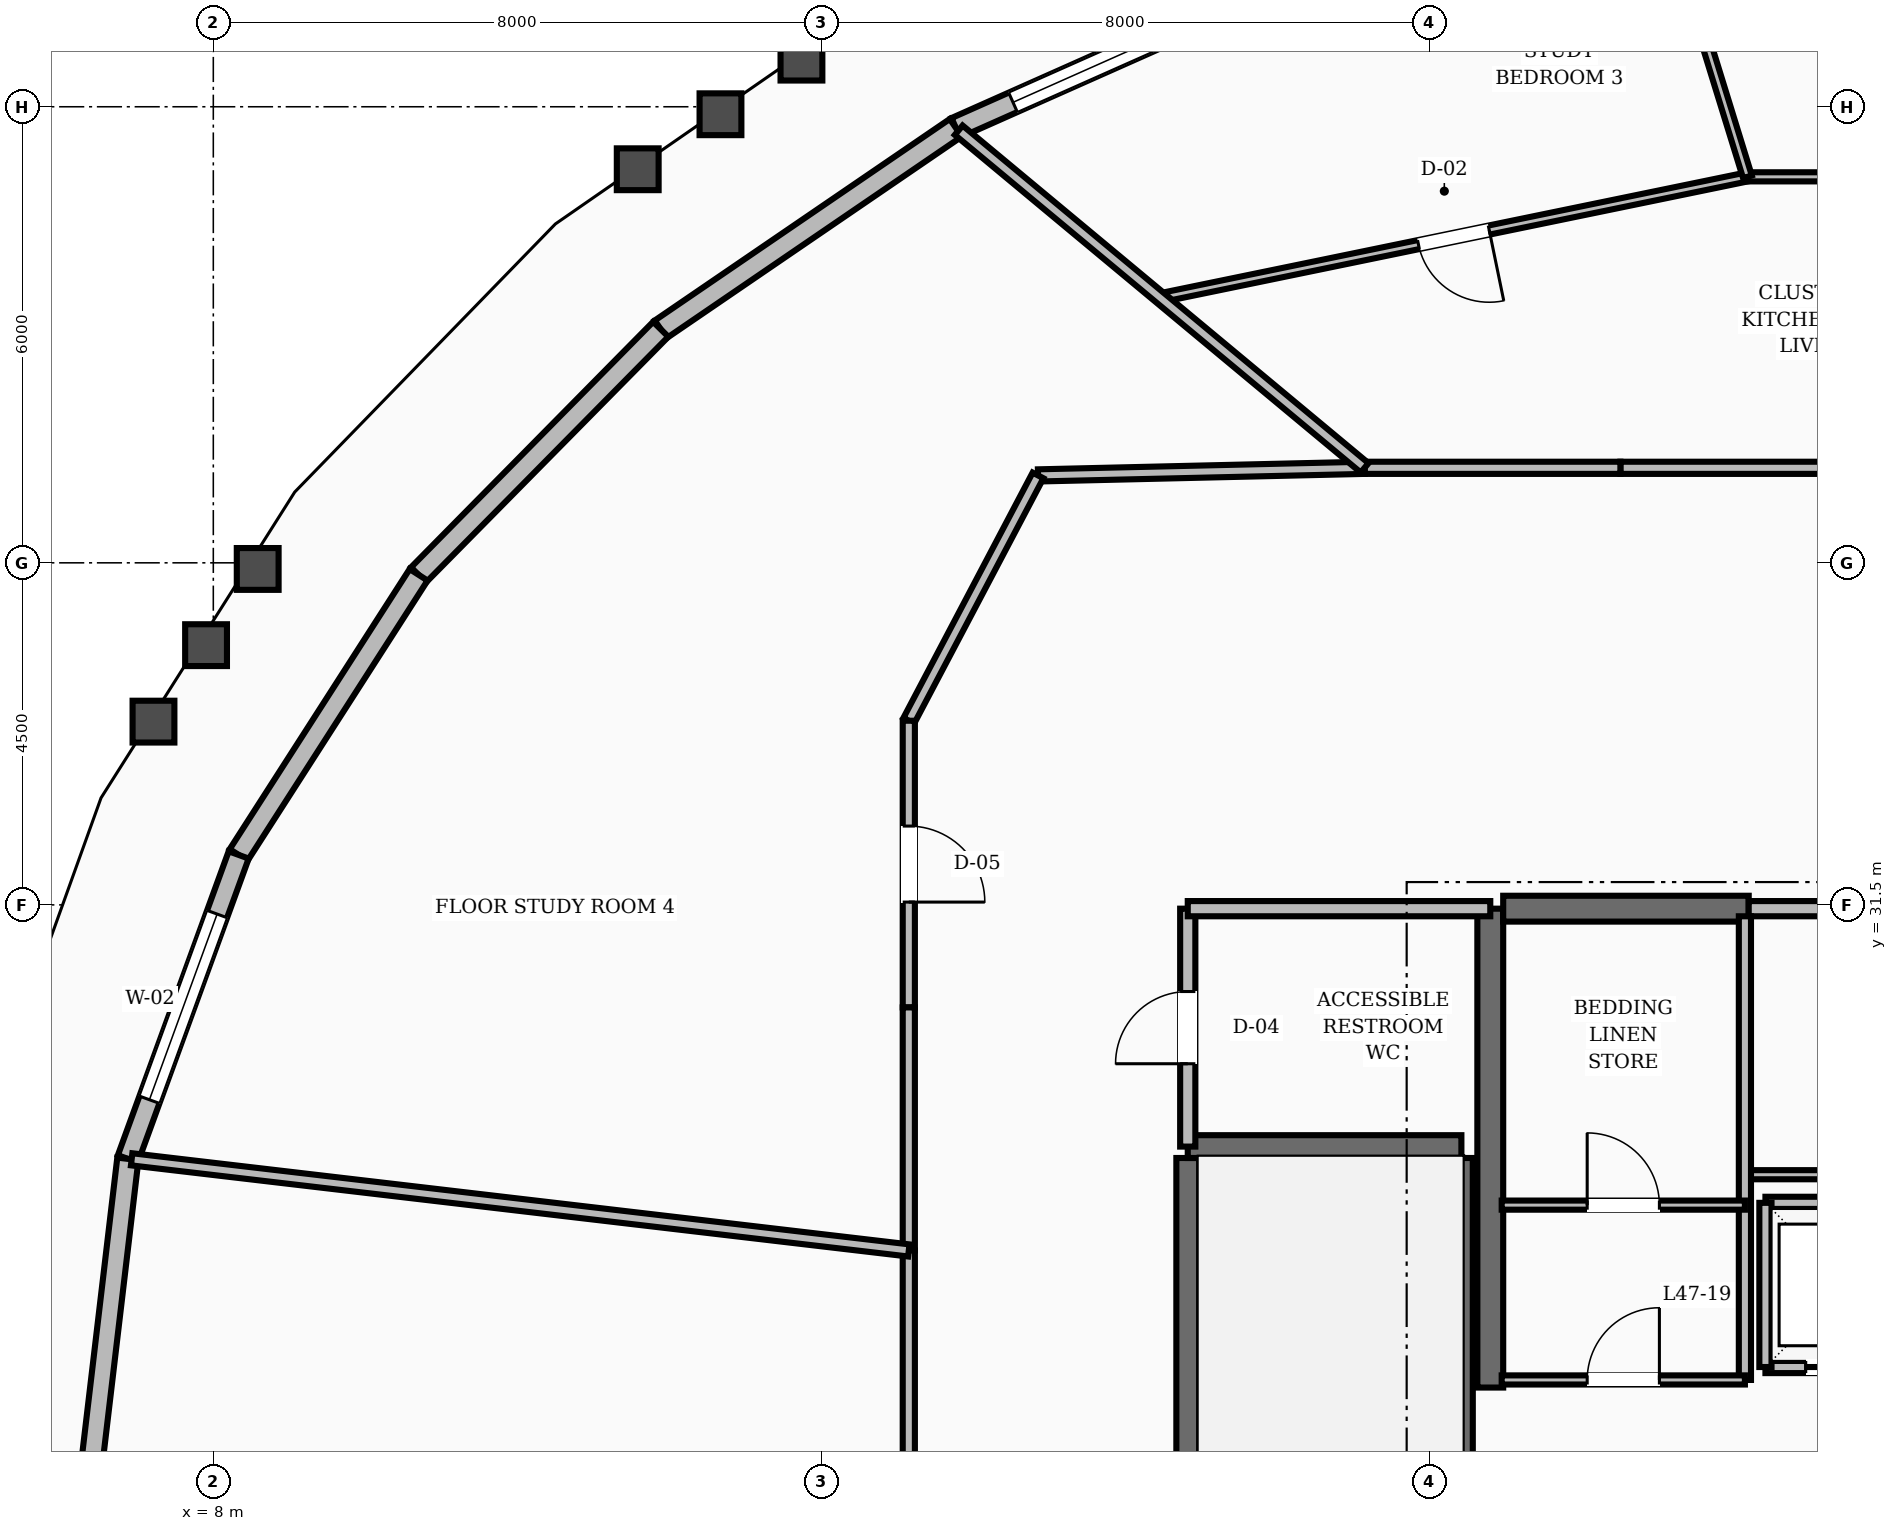
"""IFC4 building model, lengths in metres.
Left out: names, types, materials, properties, quantities, classifications, styles, units other than length and angle.
Written with IfcOpenShell. Run it as: python <this file> out.ifc"""

import sys

from ifc_helpers import new_model, si_unit, direction, frame, frame_2d, origin, place, context, subcontext, project, spatial, rectangle, extrude, element, fill, save


model = new_model("IFC4")
c1 = context("Model", 3, precision=1e-05, world=origin(), true_north=direction((0.0, 1.0)))
c2 = subcontext(c1, "Body", "Model", "MODEL_VIEW")
j1 = project(units=[si_unit("LENGTHUNIT", "METRE"), si_unit("PLANEANGLEUNIT", "RADIAN")], contexts=[c1])
p1 = place(None, origin())
s1 = spatial("IfcSite", under=j1, at=p1, CompositionType="ELEMENT")
p2 = place(p1, origin())
s2 = spatial("IfcBuilding", under=s1, at=p2, CompositionType="ELEMENT")
p3 = place(p2, frame((0.0, 0.0, 182.0)))
s3 = spatial("IfcBuildingStorey", under=s2, at=p3, CompositionType="ELEMENT", Elevation=182.0)
p4 = place(p3, frame((24.8, 25.15, 0.0), z_axis=(0.0, 0.0, 1.0), x_axis=(0.0, 1.0, 0.0)))
e1 = element("IfcWall", 1, at=p4, inside=s3, PredefinedType="SHEAR", context=c2, shape_type="SweptSolid", body=[
    extrude(rectangle(XDim=6.3, YDim=0.34, at=frame_2d((3.15, 0.0))), origin(), (0.0, 0.0, 1.0), 3.6),
])
p5 = place(p3, frame((24.97, 31.45, 0.0), z_axis=(0.0, 0.0, 1.0), x_axis=(1.0, 0.0, 0.0)))
e2 = element("IfcWall", 2, at=p5, inside=s3, PredefinedType="SHEAR", context=c2, shape_type="SweptSolid", body=[
    extrude(rectangle(XDim=3.23, YDim=0.34, at=frame_2d((1.615, 0.0))), origin(), (0.0, 0.0, 1.0), 3.6),
])
for number, where, z_axis, x_axis in (
    (3, (20.82, 19.43, 0.0), (0.0, 0.0, 1.0), (0.0, 1.0, 0.0)),
    (4, (24.42, 19.43, 0.0), (0.0, 0.0, 1.0), (0.0, 1.0, 0.0)),
):
    element("IfcWall", number, at=place(p3, frame(where, z_axis=z_axis, x_axis=x_axis)), inside=s3, PredefinedType="SHEAR", context=c2, shape_type="SweptSolid", body=[
        extrude(rectangle(XDim=8.74, YDim=0.3, at=frame_2d((4.37, 0.0))), origin(), (0.0, 0.0, 1.0), 3.6),
    ])
p6 = place(p3, frame((20.82, 28.32, 0.0), z_axis=(0.0, 0.0, 1.0), x_axis=(1.0, 0.0, 0.0)))
e5 = element("IfcWall", 5, at=p6, inside=s3, PredefinedType="SHEAR", context=c2, shape_type="SweptSolid", body=[
    extrude(rectangle(XDim=3.6, YDim=0.3, at=frame_2d((1.8, 0.0))), origin(), (0.0, 0.0, 1.0), 3.6),
])
p7 = place(p3, frame((22.197, 43.693, 0.0), z_axis=(0.0, 0.0, 1.0), x_axis=(-0.913703507389, -0.406381471754, 0.0)))
e6 = element("IfcWall", 6, at=p7, inside=s3, PredefinedType="STANDARD", context=c2, shape_type="SweptSolid", body=[
    extrude(rectangle(XDim=4.847, YDim=0.28, at=frame_2d((2.423, 0.0))), origin(), (0.0, 0.0, 1.0), 2.82),
])
p8 = place(p7, frame((0.823, 0.0, 0.8)))
e7 = element("IfcOpeningElement", 7, at=p8, cuts=e6, PredefinedType="OPENING", context=c2, shape_type="SweptSolid", body=[
    extrude(rectangle(XDim=3.2, YDim=1.65, at=frame_2d((1.6, 0.825))), frame((0.0, 0.15, 0.0), z_axis=(0.0, -1.0, 0.0), x_axis=(1.0, 0.0, 0.0)), (0.0, 0.0, 1.0), 0.3),
])
p9 = place(p3, frame((17.768, 41.723, 0.0), z_axis=(0.0, 0.0, 1.0), x_axis=(-0.825797441916, -0.563966829632, 0.0)))
e8 = element("IfcWall", 8, at=p9, inside=s3, PredefinedType="STANDARD", context=c2, shape_type="SweptSolid", body=[
    extrude(rectangle(XDim=4.7, YDim=0.28, at=frame_2d((2.35, 0.0))), origin(), (0.0, 0.0, 1.0), 2.82),
])
p10 = place(p3, frame((13.887, 39.073, 0.0), z_axis=(0.0, 0.0, 1.0), x_axis=(-0.70219293187, -0.711986717876, 0.0)))
e9 = element("IfcWall", 9, at=p10, inside=s3, PredefinedType="STANDARD", context=c2, shape_type="SweptSolid", body=[
    extrude(rectangle(XDim=4.537, YDim=0.28, at=frame_2d((2.269, 0.0))), origin(), (0.0, 0.0, 1.0), 2.82),
])
p11 = place(p3, frame((10.701, 35.842, 0.0), z_axis=(0.0, 0.0, 1.0), x_axis=(-0.54047019892, -0.841363158261, 0.0)))
e10 = element("IfcWall", 10, at=p11, inside=s3, PredefinedType="STANDARD", context=c2, shape_type="SweptSolid", body=[
    extrude(rectangle(XDim=4.38, YDim=0.28, at=frame_2d((2.19, 0.0))), origin(), (0.0, 0.0, 1.0), 2.82),
])
p12 = place(p3, frame((8.334, 32.157, 0.0), z_axis=(0.0, 0.0, 1.0), x_axis=(-0.342502880714, -0.939516778298, 0.0)))
e11 = element("IfcWall", 11, at=p12, inside=s3, PredefinedType="STANDARD", context=c2, shape_type="SweptSolid", body=[
    extrude(rectangle(XDim=4.256, YDim=0.28, at=frame_2d((2.128, 0.0))), origin(), (0.0, 0.0, 1.0), 2.82),
])
p13 = place(p12, frame((0.828, 0.0, 0.8)))
e12 = element("IfcOpeningElement", 12, at=p13, cuts=e11, PredefinedType="OPENING", context=c2, shape_type="SweptSolid", body=[
    extrude(rectangle(XDim=2.6, YDim=1.65, at=frame_2d((1.3, 0.825))), frame((0.0, 0.15, 0.0), z_axis=(0.0, -1.0, 0.0), x_axis=(1.0, 0.0, 0.0)), (0.0, 0.0, 1.0), 0.3),
])
p14 = place(p3, frame((6.876, 28.158, 0.0), z_axis=(0.0, 0.0, 1.0), x_axis=(-0.117538064351, -0.993068378023, 0.0)))
e13 = element("IfcWall", 13, at=p14, inside=s3, PredefinedType="STANDARD", context=c2, shape_type="SweptSolid", body=[
    extrude(rectangle(XDim=4.188, YDim=0.28, at=frame_2d((2.094, 0.0))), origin(), (0.0, 0.0, 1.0), 2.82),
])
p15 = place(p3, frame((20.82, 28.32, 0.0), z_axis=(0.0, 0.0, 1.0), x_axis=(0.0, 1.0, 0.0)))
e14 = element("IfcWall", 14, at=p15, inside=s3, PredefinedType="SOLIDWALL", context=c2, shape_type="SweptSolid", body=[
    extrude(rectangle(XDim=3.13, YDim=0.2, at=frame_2d((1.565, 0.0))), origin(), (0.0, 0.0, 1.0), 2.8),
])
p16 = place(p15, frame((1.09, 0.0, 0.0)))
e15 = element("IfcOpeningElement", 15, at=p16, cuts=e14, PredefinedType="OPENING", context=c2, shape_type="SweptSolid", body=[
    extrude(rectangle(XDim=0.95, YDim=2.1, at=frame_2d((0.475, 1.05))), frame((0.0, 0.11, 0.0), z_axis=(0.0, -1.0, 0.0), x_axis=(1.0, 0.0, 0.0)), (0.0, 0.0, 1.0), 0.22),
])
p17 = place(p3, frame((20.82, 31.45, 0.0), z_axis=(0.0, 0.0, 1.0), x_axis=(1.0, 0.0, 0.0)))
e16 = element("IfcWall", 16, at=p17, inside=s3, PredefinedType="SOLIDWALL", context=c2, shape_type="SweptSolid", body=[
    extrude(rectangle(XDim=3.98, YDim=0.2, at=frame_2d((1.99, 0.0))), origin(), (0.0, 0.0, 1.0), 2.8),
])
p18 = place(p3, frame((28.42, 25.42, 0.0), z_axis=(0.0, 0.0, 1.0), x_axis=(1.0, 0.0, 0.0)))
e17 = element("IfcWall", 17, at=p18, inside=s3, PredefinedType="SOLIDWALL", context=c2, shape_type="SweptSolid", body=[
    extrude(rectangle(XDim=4.66, YDim=0.16, at=frame_2d((2.33, 0.0))), origin(), (0.0, 0.0, 1.0), 2.8),
])
p19 = place(p18, frame((0.53, 0.0, 0.0)))
e18 = element("IfcOpeningElement", 18, at=p19, cuts=e17, PredefinedType="OPENING", context=c2, shape_type="SweptSolid", body=[
    extrude(rectangle(XDim=1.1, YDim=2.15, at=frame_2d((0.55, 1.075))), frame((0.0, 0.09, 0.0), z_axis=(0.0, -1.0, 0.0), x_axis=(1.0, 0.0, 0.0)), (0.0, 0.0, 1.0), 0.18),
])
p20 = place(p18, frame((3.03, 0.0, 0.0)))
e19 = element("IfcOpeningElement", 19, at=p20, cuts=e17, PredefinedType="OPENING", context=c2, shape_type="SweptSolid", body=[
    extrude(rectangle(XDim=1.1, YDim=2.15, at=frame_2d((0.55, 1.075))), frame((0.0, 0.09, 0.0), z_axis=(0.0, -1.0, 0.0), x_axis=(1.0, 0.0, 0.0)), (0.0, 0.0, 1.0), 0.18),
])
p21 = place(p3, frame((28.42, 27.58, 0.0), z_axis=(0.0, 0.0, 1.0), x_axis=(1.0, 0.0, 0.0)))
e20 = element("IfcWall", 20, at=p21, inside=s3, PredefinedType="SOLIDWALL", context=c2, shape_type="SweptSolid", body=[
    extrude(rectangle(XDim=4.66, YDim=0.16, at=frame_2d((2.33, 0.0))), origin(), (0.0, 0.0, 1.0), 2.8),
])
p22 = place(p3, frame((28.42, 25.42, 0.0), z_axis=(0.0, 0.0, 1.0), x_axis=(0.0, 1.0, 0.0)))
e21 = element("IfcWall", 21, at=p22, inside=s3, PredefinedType="SOLIDWALL", context=c2, shape_type="SweptSolid", body=[
    extrude(rectangle(XDim=2.16, YDim=0.16, at=frame_2d((1.08, 0.0))), origin(), (0.0, 0.0, 1.0), 2.8),
])
p23 = place(p3, frame((28.2, 31.45, 0.0), z_axis=(0.0, 0.0, 1.0), x_axis=(1.0, 0.0, 0.0)))
e22 = element("IfcWall", 22, at=p23, inside=s3, PredefinedType="SOLIDWALL", context=c2, shape_type="SweptSolid", body=[
    extrude(rectangle(XDim=7.6, YDim=0.2, at=frame_2d((3.8, 0.0))), origin(), (0.0, 0.0, 1.0), 2.8),
])
p24 = place(p3, frame((28.2, 27.95, 0.0), z_axis=(0.0, 0.0, 1.0), x_axis=(1.0, 0.0, 0.0)))
e23 = element("IfcWall", 23, at=p24, inside=s3, PredefinedType="PARTITIONING", context=c2, shape_type="SweptSolid", body=[
    extrude(rectangle(XDim=7.6, YDim=0.12, at=frame_2d((3.8, 0.0))), origin(), (0.0, 0.0, 1.0), 2.8),
])
p25 = place(p3, frame((28.15, 25.25, 0.0), z_axis=(0.0, 0.0, 1.0), x_axis=(0.0, 1.0, 0.0)))
e24 = element("IfcWall", 24, at=p25, inside=s3, PredefinedType="SOLIDWALL", context=c2, shape_type="SweptSolid", body=[
    extrude(rectangle(XDim=6.1, YDim=0.16, at=frame_2d((3.05, 0.0))), origin(), (0.0, 0.0, 1.0), 2.8),
])
p26 = place(p3, frame((24.95, 25.25, 0.0), z_axis=(0.0, 0.0, 1.0), x_axis=(1.0, 0.0, 0.0)))
e25 = element("IfcWall", 25, at=p26, inside=s3, PredefinedType="PARTITIONING", context=c2, shape_type="SweptSolid", body=[
    extrude(rectangle(XDim=3.2, YDim=0.12, at=frame_2d((1.6, 0.0))), origin(), (0.0, 0.0, 1.0), 2.8),
])
p27 = place(p26, frame((1.125, 0.0, 0.0)))
e26 = element("IfcOpeningElement", 26, at=p27, cuts=e25, PredefinedType="OPENING", context=c2, shape_type="SweptSolid", body=[
    extrude(rectangle(XDim=0.95, YDim=2.1, at=frame_2d((0.475, 1.05))), frame((0.0, 0.07, 0.0), z_axis=(0.0, -1.0, 0.0), x_axis=(1.0, 0.0, 0.0)), (0.0, 0.0, 1.0), 0.14),
])
p28 = place(p3, frame((24.95, 27.55, 0.0), z_axis=(0.0, 0.0, 1.0), x_axis=(1.0, 0.0, 0.0)))
e27 = element("IfcWall", 27, at=p28, inside=s3, PredefinedType="PARTITIONING", context=c2, shape_type="SweptSolid", body=[
    extrude(rectangle(XDim=3.2, YDim=0.12, at=frame_2d((1.6, 0.0))), origin(), (0.0, 0.0, 1.0), 2.8),
])
p29 = place(p28, frame((1.125, 0.0, 0.0)))
e28 = element("IfcOpeningElement", 28, at=p29, cuts=e27, PredefinedType="OPENING", context=c2, shape_type="SweptSolid", body=[
    extrude(rectangle(XDim=0.95, YDim=2.1, at=frame_2d((0.475, 1.05))), frame((0.0, 0.07, 0.0), z_axis=(0.0, -1.0, 0.0), x_axis=(1.0, 0.0, 0.0)), (0.0, 0.0, 1.0), 0.14),
])
p30 = place(p3, frame((29.365, 37.25, 0.0), z_axis=(0.0, 0.0, 1.0), x_axis=(-1.0, 0.0, 0.0)))
e29 = element("IfcWall", 29, at=p30, inside=s3, PredefinedType="SOLIDWALL", context=c2, shape_type="SweptSolid", body=[
    extrude(rectangle(XDim=2.853, YDim=0.16, at=frame_2d((1.426, 0.0))), origin(), (0.0, 0.0, 1.0), 2.8),
])
p31 = place(p3, frame((26.512, 37.25, 0.0), z_axis=(0.0, 0.0, 1.0), x_axis=(-1.0, 0.0, 0.0)))
e30 = element("IfcWall", 30, at=p31, inside=s3, PredefinedType="SOLIDWALL", context=c2, shape_type="SweptSolid", body=[
    extrude(rectangle(XDim=3.365, YDim=0.16, at=frame_2d((1.683, 0.0))), origin(), (0.0, 0.0, 1.0), 2.8),
])
p32 = place(p3, frame((23.146, 37.25, 0.0), z_axis=(0.0, 0.0, 1.0), x_axis=(-0.999728709658, -0.023291781507, 0.0)))
e31 = element("IfcWall", 31, at=p32, inside=s3, PredefinedType="SOLIDWALL", context=c2, shape_type="SweptSolid", body=[
    extrude(rectangle(XDim=4.298, YDim=0.16, at=frame_2d((2.149, 0.0))), origin(), (0.0, 0.0, 1.0), 2.8),
])
p33 = place(p3, frame((18.85, 37.15, 0.0), z_axis=(0.0, 0.0, 1.0), x_axis=(-0.466093963429, -0.884735224378, 0.0)))
e32 = element("IfcWall", 32, at=p33, inside=s3, PredefinedType="SOLIDWALL", context=c2, shape_type="SweptSolid", body=[
    extrude(rectangle(XDim=3.648, YDim=0.16, at=frame_2d((1.824, 0.0))), origin(), (0.0, 0.0, 1.0), 2.8),
])
p34 = place(p3, frame((17.15, 33.923, 0.0), z_axis=(0.0, 0.0, 1.0), x_axis=(0.0, -1.0, 0.0)))
e33 = element("IfcWall", 33, at=p34, inside=s3, PredefinedType="SOLIDWALL", context=c2, shape_type="SweptSolid", body=[
    extrude(rectangle(XDim=3.771, YDim=0.16, at=frame_2d((1.886, 0.0))), origin(), (0.0, 0.0, 1.0), 2.8),
])
p35 = place(p34, frame((1.386, 0.0, 0.0)))
e34 = element("IfcOpeningElement", 34, at=p35, cuts=e33, PredefinedType="OPENING", context=c2, shape_type="SweptSolid", body=[
    extrude(rectangle(XDim=1.0, YDim=2.1, at=frame_2d((0.5, 1.05))), frame((0.0, 0.09, 0.0), z_axis=(0.0, -1.0, 0.0), x_axis=(1.0, 0.0, 0.0)), (0.0, 0.0, 1.0), 0.18),
])
p36 = place(p3, frame((17.15, 30.151, 0.0), z_axis=(0.0, 0.0, 1.0), x_axis=(0.0, -1.0, 0.0)))
e35 = element("IfcWall", 35, at=p36, inside=s3, PredefinedType="SOLIDWALL", context=c2, shape_type="SweptSolid", body=[
    extrude(rectangle(XDim=3.197, YDim=0.16, at=frame_2d((1.599, 0.0))), origin(), (0.0, 0.0, 1.0), 2.8),
])
p37 = place(p3, frame((17.15, 26.954, 0.0), z_axis=(0.0, 0.0, 1.0), x_axis=(0.0, -1.0, 0.0)))
e36 = element("IfcWall", 36, at=p37, inside=s3, PredefinedType="SOLIDWALL", context=c2, shape_type="SweptSolid", body=[
    extrude(rectangle(XDim=2.954, YDim=0.16, at=frame_2d((1.477, 0.0))), origin(), (0.0, 0.0, 1.0), 2.8),
])
p38 = place(p3, frame((35.816, 41.078, 0.0), z_axis=(0.0, 0.0, 1.0), x_axis=(-1.0, 0.0, 0.0)))
e37 = element("IfcWall", 37, at=p38, inside=s3, PredefinedType="PARTITIONING", context=c2, shape_type="SweptSolid", body=[
    extrude(rectangle(XDim=7.633, YDim=0.12, at=frame_2d((3.816, 0.0))), origin(), (0.0, 0.0, 1.0), 2.8),
])
p39 = place(p38, frame((3.342, 0.0, 0.0)))
e38 = element("IfcOpeningElement", 38, at=p39, cuts=e37, PredefinedType="OPENING", context=c2, shape_type="SweptSolid", body=[
    extrude(rectangle(XDim=0.95, YDim=2.1, at=frame_2d((0.475, 1.05))), frame((0.0, 0.07, 0.0), z_axis=(0.0, -1.0, 0.0), x_axis=(1.0, 0.0, 0.0)), (0.0, 0.0, 1.0), 0.14),
])
p40 = place(p3, frame((28.184, 41.078, 0.0), z_axis=(0.0, 0.0, 1.0), x_axis=(-0.979440858822, -0.201731514814, 0.0)))
e39 = element("IfcWall", 39, at=p40, inside=s3, PredefinedType="PARTITIONING", context=c2, shape_type="SweptSolid", body=[
    extrude(rectangle(XDim=7.888, YDim=0.12, at=frame_2d((3.944, 0.0))), origin(), (0.0, 0.0, 1.0), 2.8),
])
p41 = place(p40, frame((3.469, 0.0, 0.0)))
e40 = element("IfcOpeningElement", 40, at=p41, cuts=e39, PredefinedType="OPENING", context=c2, shape_type="SweptSolid", body=[
    extrude(rectangle(XDim=0.95, YDim=2.1, at=frame_2d((0.475, 1.05))), frame((0.0, 0.07, 0.0), z_axis=(0.0, -1.0, 0.0), x_axis=(1.0, 0.0, 0.0)), (0.0, 0.0, 1.0), 0.14),
])
p42 = place(p3, frame((28.184, 41.078, 0.0), z_axis=(0.0, 0.0, 1.0), x_axis=(-0.294857647308, 0.955541191066, 0.0)))
e41 = element("IfcWall", 41, at=p42, inside=s3, PredefinedType="PARTITIONING", context=c2, shape_type="SweptSolid", body=[
    extrude(rectangle(XDim=3.956, YDim=0.12, at=frame_2d((1.978, 0.0))), origin(), (0.0, 0.0, 1.0), 2.8),
])
p43 = place(p3, frame((23.146, 37.25, 0.0), z_axis=(0.0, 0.0, 1.0), x_axis=(-0.768805862504, 0.639482248213, 0.0)))
e42 = element("IfcWall", 42, at=p43, inside=s3, PredefinedType="SOLIDWALL", context=c2, shape_type="SweptSolid", body=[
    extrude(rectangle(XDim=6.945, YDim=0.16, at=frame_2d((3.473, 0.0))), origin(), (0.0, 0.0, 1.0), 2.8),
])
p44 = place(p3, frame((17.15, 26.954, 0.0), z_axis=(0.0, 0.0, 1.0), x_axis=(-0.993196826009, 0.116447691287, 0.0)))
e43 = element("IfcWall", 43, at=p44, inside=s3, PredefinedType="SOLIDWALL", context=c2, shape_type="SweptSolid", body=[
    extrude(rectangle(XDim=10.294, YDim=0.16, at=frame_2d((5.147, 0.0))), origin(), (0.0, 0.0, 1.0), 2.8),
])
p45 = place(p8, origin())
e44 = element("IfcWindow", 44, at=p45, inside=s3, PartitioningType="SINGLE_PANEL", PredefinedType="WINDOW", context=c2, shape_type="SweptSolid", body=[
    extrude(rectangle(XDim=3.2, YDim=1.65, at=frame_2d((1.6, 0.825))), frame((0.0, 0.03, 0.0), z_axis=(0.0, -1.0, 0.0), x_axis=(1.0, 0.0, 0.0)), (0.0, 0.0, 1.0), 0.06),
])
fill(e7, e44)
p46 = place(p13, origin())
e45 = element("IfcWindow", 45, at=p46, inside=s3, PartitioningType="SINGLE_PANEL", PredefinedType="WINDOW", context=c2, shape_type="SweptSolid", body=[
    extrude(rectangle(XDim=2.6, YDim=1.65, at=frame_2d((1.3, 0.825))), frame((0.0, 0.03, 0.0), z_axis=(0.0, -1.0, 0.0), x_axis=(1.0, 0.0, 0.0)), (0.0, 0.0, 1.0), 0.06),
])
fill(e12, e45)
p47 = place(p16, origin())
e46 = element("IfcDoor", 46, at=p47, inside=s3, OperationType="SINGLE_SWING_LEFT", PredefinedType="DOOR", context=c2, shape_type="SweptSolid", body=[
    extrude(rectangle(XDim=0.95, YDim=2.1, at=frame_2d((0.475, 1.05))), frame((0.0, 0.025, 0.0), z_axis=(0.0, -1.0, 0.0), x_axis=(1.0, 0.0, 0.0)), (0.0, 0.0, 1.0), 0.05),
])
fill(e15, e46)
p48 = place(p19, origin())
e47 = element("IfcDoor", 47, at=p48, inside=s3, OperationType="SLIDING_TO_RIGHT", PredefinedType="DOOR", context=c2, shape_type="SweptSolid", body=[
    extrude(rectangle(XDim=1.1, YDim=2.15, at=frame_2d((0.55, 1.075))), frame((0.0, 0.025, 0.0), z_axis=(0.0, -1.0, 0.0), x_axis=(1.0, 0.0, 0.0)), (0.0, 0.0, 1.0), 0.05),
])
fill(e18, e47)
p49 = place(p27, origin())
e48 = element("IfcDoor", 48, at=p49, inside=s3, OperationType="SINGLE_SWING_RIGHT", PredefinedType="DOOR", context=c2, shape_type="SweptSolid", body=[
    extrude(rectangle(XDim=0.95, YDim=2.1, at=frame_2d((0.475, 1.05))), frame((0.0, 0.025, 0.0), z_axis=(0.0, -1.0, 0.0), x_axis=(1.0, 0.0, 0.0)), (0.0, 0.0, 1.0), 0.05),
])
fill(e26, e48)
p50 = place(p29, origin())
e49 = element("IfcDoor", 49, at=p50, inside=s3, OperationType="SINGLE_SWING_LEFT", PredefinedType="DOOR", context=c2, shape_type="SweptSolid", body=[
    extrude(rectangle(XDim=0.95, YDim=2.1, at=frame_2d((0.475, 1.05))), frame((0.0, 0.025, 0.0), z_axis=(0.0, -1.0, 0.0), x_axis=(1.0, 0.0, 0.0)), (0.0, 0.0, 1.0), 0.05),
])
fill(e28, e49)
p51 = place(p41, origin())
e50 = element("IfcDoor", 50, at=p51, inside=s3, OperationType="SINGLE_SWING_LEFT", PredefinedType="DOOR", context=c2, shape_type="SweptSolid", body=[
    extrude(rectangle(XDim=0.95, YDim=2.1, at=frame_2d((0.475, 1.05))), frame((0.0, 0.025, 0.0), z_axis=(0.0, -1.0, 0.0), x_axis=(1.0, 0.0, 0.0)), (0.0, 0.0, 1.0), 0.05),
])
fill(e40, e50)
p52 = place(p35, origin())
e51 = element("IfcDoor", 51, at=p52, inside=s3, OperationType="SINGLE_SWING_RIGHT", PredefinedType="DOOR", context=c2, shape_type="SweptSolid", body=[
    extrude(rectangle(XDim=1.0, YDim=2.1, at=frame_2d((0.5, 1.05))), frame((0.0, 0.025, 0.0), z_axis=(0.0, -1.0, 0.0), x_axis=(1.0, 0.0, 0.0)), (0.0, 0.0, 1.0), 0.05),
])
fill(e34, e51)
save(model, sys.argv[1])
